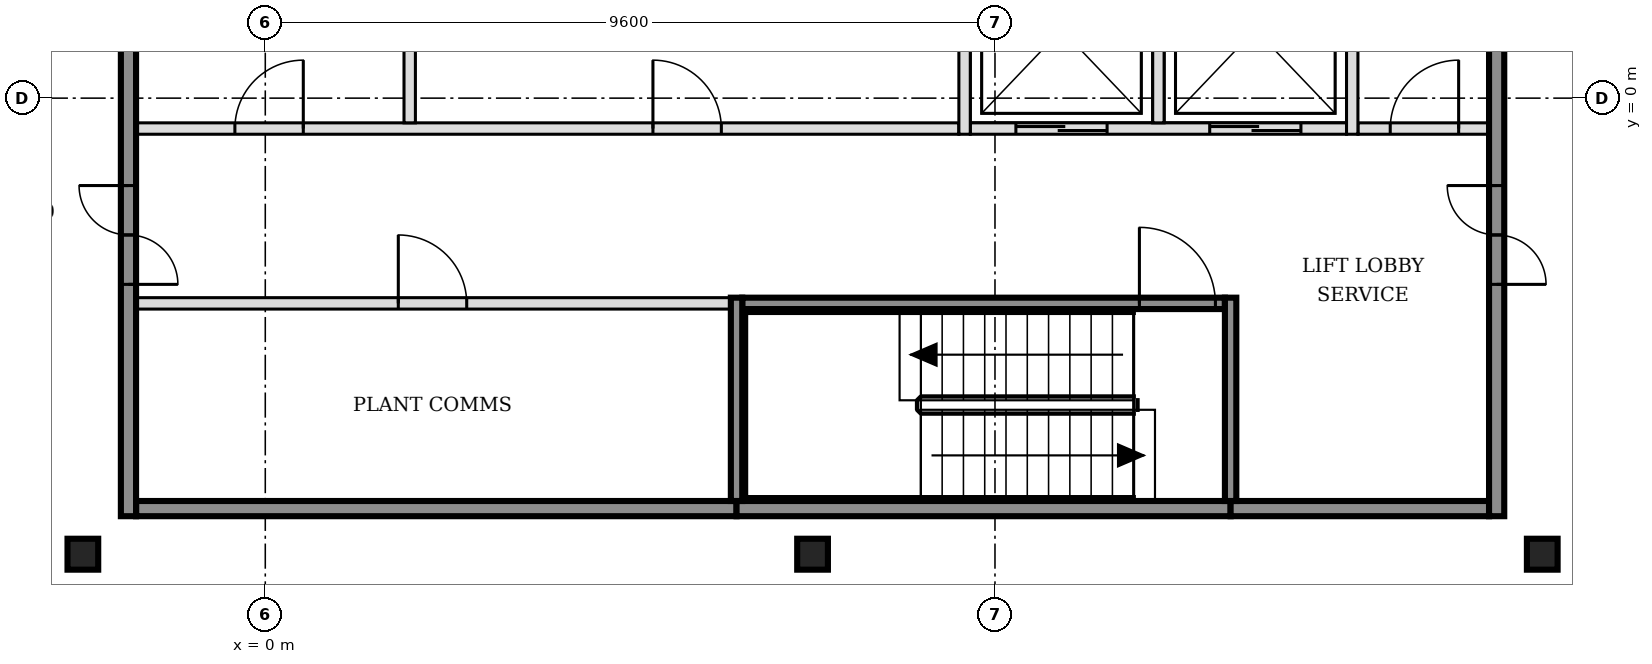
"""IFC4 building model, lengths in metres.
Left out: names, types, materials, properties, quantities, classifications, styles, units other than length and angle.
Written with IfcOpenShell. Run it as: python <this file> out.ifc"""

import sys

from ifc_helpers import new_model, si_unit, direction, frame, frame_2d, origin, origin_2d, place, context, subcontext, project, spatial, rectangle, i_section, extrude, element, fill, save


model = new_model("IFC4")
c1 = context("Model", 3, precision=1e-05, world=origin(), true_north=direction((0.0, 1.0)))
c2 = subcontext(c1, "Body", "Model", "MODEL_VIEW")
j1 = project(units=[si_unit("LENGTHUNIT", "METRE"), si_unit("PLANEANGLEUNIT", "RADIAN")], contexts=[c1])
p1 = place(None, origin())
s1 = spatial("IfcSite", under=j1, at=p1, CompositionType="ELEMENT")
p2 = place(p1, origin())
s2 = spatial("IfcBuilding", under=s1, at=p2, CompositionType="ELEMENT")
p3 = place(p2, frame((0.0, 0.0, 197.4)))
s3 = spatial("IfcBuildingStorey", under=s2, at=p3, CompositionType="ELEMENT", Elevation=197.4)
for number, where, z_axis, x_axis in (
    (1, (-2.4, -6.0, -0.15), (0.0, 0.0, 1.0), (1.0, 0.0, 0.0)),
    (2, (7.2, -6.0, -0.15), (0.0, 0.0, 1.0), (1.0, 0.0, 0.0)),
    (3, (16.8, -6.0, -0.15), (0.0, 0.0, 1.0), (1.0, 0.0, 0.0)),
):
    element("IfcColumn", number, at=place(p3, frame(where, z_axis=z_axis, x_axis=x_axis)), inside=s3, PredefinedType="COLUMN", context=c2, shape_type="SweptSolid", body=[
        extrude(i_section(OverallWidth=0.404, OverallDepth=0.407, WebThickness=0.027, FlangeThickness=0.044, FilletRadius=0.015, at=origin_2d()), origin(), (0.0, 0.0, 1.0), 3.6),
    ])
p4 = place(p3, frame((-1.7, -5.4, 0.0), z_axis=(0.0, 0.0, 1.0), x_axis=(1.0, 0.0, 0.0)))
e4 = element("IfcWall", 4, at=p4, inside=s3, PredefinedType="SOLIDWALL", context=c2, shape_type="SweptSolid", body=[
    extrude(rectangle(XDim=7.9, YDim=0.2, at=frame_2d((3.95, 0.0))), origin(), (0.0, 0.0, 1.0), 3.45),
])
p5 = place(p3, frame((6.2, -5.4, 0.0), z_axis=(0.0, 0.0, 1.0), x_axis=(1.0, 0.0, 0.0)))
e5 = element("IfcWall", 5, at=p5, inside=s3, PredefinedType="SOLIDWALL", context=c2, shape_type="SweptSolid", body=[
    extrude(rectangle(XDim=6.5, YDim=0.2, at=frame_2d((3.25, 0.0))), origin(), (0.0, 0.0, 1.0), 3.45),
])
p6 = place(p3, frame((12.7, -5.4, 0.0), z_axis=(0.0, 0.0, 1.0), x_axis=(1.0, 0.0, 0.0)))
e6 = element("IfcWall", 6, at=p6, inside=s3, PredefinedType="SOLIDWALL", context=c2, shape_type="SweptSolid", body=[
    extrude(rectangle(XDim=3.4, YDim=0.2, at=frame_2d((1.7, 0.0))), origin(), (0.0, 0.0, 1.0), 3.45),
])
p7 = place(p3, frame((-1.7, -2.7, 0.0), z_axis=(0.0, 0.0, 1.0), x_axis=(1.0, 0.0, 0.0)))
e7 = element("IfcWall", 7, at=p7, inside=s3, PredefinedType="PARTITIONING", context=c2, shape_type="SweptSolid", body=[
    extrude(rectangle(XDim=7.825, YDim=0.15, at=frame_2d((3.913, 0.0))), origin(), (0.0, 0.0, 1.0), 3.45),
])
p8 = place(p7, frame((3.45, 0.0, 0.0)))
e8 = element("IfcOpeningElement", 8, at=p8, cuts=e7, PredefinedType="OPENING", context=c2, shape_type="SweptSolid", body=[
    extrude(rectangle(XDim=0.9, YDim=2.1, at=frame_2d((0.45, 1.05))), frame((0.0, 0.085, 0.0), z_axis=(0.0, -1.0, 0.0), x_axis=(1.0, 0.0, 0.0)), (0.0, 0.0, 1.0), 0.17),
])
p9 = place(p3, frame((6.275, -2.7, 0.0), z_axis=(0.0, 0.0, 1.0), x_axis=(1.0, 0.0, 0.0)))
e9 = element("IfcWall", 9, at=p9, inside=s3, PredefinedType="SOLIDWALL", context=c2, shape_type="SweptSolid", body=[
    extrude(rectangle(XDim=6.35, YDim=0.15, at=frame_2d((3.175, 0.0))), origin(), (0.0, 0.0, 1.0), 3.45),
])
p10 = place(p9, frame((5.225, 0.0, 0.0)))
e10 = element("IfcOpeningElement", 10, at=p10, cuts=e9, PredefinedType="OPENING", context=c2, shape_type="SweptSolid", body=[
    extrude(rectangle(XDim=1.0, YDim=2.1, at=frame_2d((0.5, 1.05))), frame((0.0, 0.085, 0.0), z_axis=(0.0, -1.0, 0.0), x_axis=(1.0, 0.0, 0.0)), (0.0, 0.0, 1.0), 0.17),
])
p11 = place(p3, frame((-1.7, -0.4, 0.0), z_axis=(0.0, 0.0, 1.0), x_axis=(1.0, 0.0, 0.0)))
e11 = element("IfcWall", 11, at=p11, inside=s3, PredefinedType="PARTITIONING", context=c2, shape_type="SweptSolid", body=[
    extrude(rectangle(XDim=10.825, YDim=0.15, at=frame_2d((5.413, 0.0))), origin(), (0.0, 0.0, 1.0), 3.45),
])
p12 = place(p11, frame((1.3, 0.0, 0.0)))
e12 = element("IfcOpeningElement", 12, at=p12, cuts=e11, PredefinedType="OPENING", context=c2, shape_type="SweptSolid", body=[
    extrude(rectangle(XDim=0.9, YDim=2.1, at=frame_2d((0.45, 1.05))), frame((0.0, 0.085, 0.0), z_axis=(0.0, -1.0, 0.0), x_axis=(1.0, 0.0, 0.0)), (0.0, 0.0, 1.0), 0.17),
])
p13 = place(p11, frame((6.8, 0.0, 0.0)))
e13 = element("IfcOpeningElement", 13, at=p13, cuts=e11, PredefinedType="OPENING", context=c2, shape_type="SweptSolid", body=[
    extrude(rectangle(XDim=0.9, YDim=2.1, at=frame_2d((0.45, 1.05))), frame((0.0, 0.085, 0.0), z_axis=(0.0, -1.0, 0.0), x_axis=(1.0, 0.0, 0.0)), (0.0, 0.0, 1.0), 0.17),
])
p14 = place(p3, frame((9.275, -0.4, 0.0), z_axis=(0.0, 0.0, 1.0), x_axis=(1.0, 0.0, 0.0)))
e14 = element("IfcWall", 14, at=p14, inside=s3, PredefinedType="SOLIDWALL", context=c2, shape_type="SweptSolid", body=[
    extrude(rectangle(XDim=4.95, YDim=0.15, at=frame_2d((2.475, 0.0))), origin(), (0.0, 0.0, 1.0), 3.45),
])
p15 = place(p14, frame((0.6, 0.0, 0.0)))
e15 = element("IfcOpeningElement", 15, at=p15, cuts=e14, PredefinedType="OPENING", context=c2, shape_type="SweptSolid", body=[
    extrude(rectangle(XDim=1.2, YDim=2.1, at=frame_2d((0.6, 1.05))), frame((0.0, 0.085, 0.0), z_axis=(0.0, -1.0, 0.0), x_axis=(1.0, 0.0, 0.0)), (0.0, 0.0, 1.0), 0.17),
])
p16 = place(p14, frame((3.15, 0.0, 0.0)))
e16 = element("IfcOpeningElement", 16, at=p16, cuts=e14, PredefinedType="OPENING", context=c2, shape_type="SweptSolid", body=[
    extrude(rectangle(XDim=1.2, YDim=2.1, at=frame_2d((0.6, 1.05))), frame((0.0, 0.085, 0.0), z_axis=(0.0, -1.0, 0.0), x_axis=(1.0, 0.0, 0.0)), (0.0, 0.0, 1.0), 0.17),
])
p17 = place(p3, frame((14.375, -0.4, 0.0), z_axis=(0.0, 0.0, 1.0), x_axis=(1.0, 0.0, 0.0)))
e17 = element("IfcWall", 17, at=p17, inside=s3, PredefinedType="PARTITIONING", context=c2, shape_type="SweptSolid", body=[
    extrude(rectangle(XDim=1.725, YDim=0.15, at=frame_2d((0.863, 0.0))), origin(), (0.0, 0.0, 1.0), 3.45),
])
p18 = place(p17, frame((0.425, 0.0, 0.0)))
e18 = element("IfcOpeningElement", 18, at=p18, cuts=e17, PredefinedType="OPENING", context=c2, shape_type="SweptSolid", body=[
    extrude(rectangle(XDim=0.9, YDim=2.1, at=frame_2d((0.45, 1.05))), frame((0.0, 0.085, 0.0), z_axis=(0.0, -1.0, 0.0), x_axis=(1.0, 0.0, 0.0)), (0.0, 0.0, 1.0), 0.17),
])
p19 = place(p3, frame((-1.8, -5.5, 0.0), z_axis=(0.0, 0.0, 1.0), x_axis=(0.0, 1.0, 0.0)))
e19 = element("IfcWall", 19, at=p19, inside=s3, PredefinedType="SOLIDWALL", context=c2, shape_type="SweptSolid", body=[
    extrude(rectangle(XDim=15.8, YDim=0.2, at=frame_2d((7.9, 0.0))), origin(), (0.0, 0.0, 1.0), 3.45),
])
p20 = place(p19, frame((3.05, 0.0, 0.0)))
e20 = element("IfcOpeningElement", 20, at=p20, cuts=e19, PredefinedType="OPENING", context=c2, shape_type="SweptSolid", body=[
    extrude(rectangle(XDim=1.3, YDim=2.1, at=frame_2d((0.65, 1.05))), frame((0.0, 0.11, 0.0), z_axis=(0.0, -1.0, 0.0), x_axis=(1.0, 0.0, 0.0)), (0.0, 0.0, 1.0), 0.22),
])
p21 = place(p19, frame((11.45, 0.0, 0.0)))
e21 = element("IfcOpeningElement", 21, at=p21, cuts=e19, PredefinedType="OPENING", context=c2, shape_type="SweptSolid", body=[
    extrude(rectangle(XDim=1.3, YDim=2.1, at=frame_2d((0.65, 1.05))), frame((0.0, 0.11, 0.0), z_axis=(0.0, -1.0, 0.0), x_axis=(1.0, 0.0, 0.0)), (0.0, 0.0, 1.0), 0.22),
])
p22 = place(p3, frame((1.9, -0.325, 0.0), z_axis=(0.0, 0.0, 1.0), x_axis=(0.0, 1.0, 0.0)))
e22 = element("IfcWall", 22, at=p22, inside=s3, PredefinedType="PARTITIONING", context=c2, shape_type="SweptSolid", body=[
    extrude(rectangle(XDim=2.45, YDim=0.15, at=frame_2d((1.225, 0.0))), origin(), (0.0, 0.0, 1.0), 3.45),
])
p23 = place(p3, frame((6.2, -5.3, 0.0), z_axis=(0.0, 0.0, 1.0), x_axis=(0.0, 1.0, 0.0)))
e23 = element("IfcWall", 23, at=p23, inside=s3, PredefinedType="SOLIDWALL", context=c2, shape_type="SweptSolid", body=[
    extrude(rectangle(XDim=2.675, YDim=0.15, at=frame_2d((1.337, 0.0))), origin(), (0.0, 0.0, 1.0), 3.45),
])
p24 = place(p3, frame((9.2, -0.475, 0.0), z_axis=(0.0, 0.0, 1.0), x_axis=(0.0, 1.0, 0.0)))
e24 = element("IfcWall", 24, at=p24, inside=s3, PredefinedType="SOLIDWALL", context=c2, shape_type="SweptSolid", body=[
    extrude(rectangle(XDim=2.6, YDim=0.15, at=frame_2d((1.3, 0.0))), origin(), (0.0, 0.0, 1.0), 3.45),
])
p25 = place(p3, frame((11.75, -0.325, 0.0), z_axis=(0.0, 0.0, 1.0), x_axis=(0.0, 1.0, 0.0)))
e25 = element("IfcWall", 25, at=p25, inside=s3, PredefinedType="SOLIDWALL", context=c2, shape_type="SweptSolid", body=[
    extrude(rectangle(XDim=2.45, YDim=0.15, at=frame_2d((1.225, 0.0))), origin(), (0.0, 0.0, 1.0), 3.45),
])
p26 = place(p3, frame((12.7, -5.3, 0.0), z_axis=(0.0, 0.0, 1.0), x_axis=(0.0, 1.0, 0.0)))
e26 = element("IfcWall", 26, at=p26, inside=s3, PredefinedType="SOLIDWALL", context=c2, shape_type="SweptSolid", body=[
    extrude(rectangle(XDim=2.675, YDim=0.15, at=frame_2d((1.337, 0.0))), origin(), (0.0, 0.0, 1.0), 3.45),
])
p27 = place(p3, frame((14.3, -0.475, 0.0), z_axis=(0.0, 0.0, 1.0), x_axis=(0.0, 1.0, 0.0)))
e27 = element("IfcWall", 27, at=p27, inside=s3, PredefinedType="SOLIDWALL", context=c2, shape_type="SweptSolid", body=[
    extrude(rectangle(XDim=2.75, YDim=0.15, at=frame_2d((1.375, 0.0))), origin(), (0.0, 0.0, 1.0), 3.45),
])
p28 = place(p3, frame((16.2, -5.5, 0.0), z_axis=(0.0, 0.0, 1.0), x_axis=(0.0, 1.0, 0.0)))
e28 = element("IfcWall", 28, at=p28, inside=s3, PredefinedType="SOLIDWALL", context=c2, shape_type="SweptSolid", body=[
    extrude(rectangle(XDim=15.8, YDim=0.2, at=frame_2d((7.9, 0.0))), origin(), (0.0, 0.0, 1.0), 3.45),
])
p29 = place(p28, frame((3.05, 0.0, 0.0)))
e29 = element("IfcOpeningElement", 29, at=p29, cuts=e28, PredefinedType="OPENING", context=c2, shape_type="SweptSolid", body=[
    extrude(rectangle(XDim=1.3, YDim=2.1, at=frame_2d((0.65, 1.05))), frame((0.0, 0.11, 0.0), z_axis=(0.0, -1.0, 0.0), x_axis=(1.0, 0.0, 0.0)), (0.0, 0.0, 1.0), 0.22),
])
p30 = place(p28, frame((11.45, 0.0, 0.0)))
e30 = element("IfcOpeningElement", 30, at=p30, cuts=e28, PredefinedType="OPENING", context=c2, shape_type="SweptSolid", body=[
    extrude(rectangle(XDim=1.3, YDim=2.1, at=frame_2d((0.65, 1.05))), frame((0.0, 0.11, 0.0), z_axis=(0.0, -1.0, 0.0), x_axis=(1.0, 0.0, 0.0)), (0.0, 0.0, 1.0), 0.22),
])
p31 = place(p15, origin())
e31 = element("IfcDoor", 31, at=p31, inside=s3, OperationType="DOUBLE_DOOR_SLIDING", PredefinedType="DOOR", context=c2, shape_type="SweptSolid", body=[
    extrude(rectangle(XDim=1.2, YDim=2.1, at=frame_2d((0.6, 1.05))), frame((0.0, 0.025, 0.0), z_axis=(0.0, -1.0, 0.0), x_axis=(1.0, 0.0, 0.0)), (0.0, 0.0, 1.0), 0.05),
])
fill(e15, e31)
p32 = place(p16, origin())
e32 = element("IfcDoor", 32, at=p32, inside=s3, OperationType="DOUBLE_DOOR_SLIDING", PredefinedType="DOOR", context=c2, shape_type="SweptSolid", body=[
    extrude(rectangle(XDim=1.2, YDim=2.1, at=frame_2d((0.6, 1.05))), frame((0.0, 0.025, 0.0), z_axis=(0.0, -1.0, 0.0), x_axis=(1.0, 0.0, 0.0)), (0.0, 0.0, 1.0), 0.05),
])
fill(e16, e32)
p33 = place(p10, origin())
e33 = element("IfcDoor", 33, at=p33, inside=s3, OperationType="SINGLE_SWING_LEFT", PredefinedType="DOOR", context=c2, shape_type="SweptSolid", body=[
    extrude(rectangle(XDim=1.0, YDim=2.1, at=frame_2d((0.5, 1.05))), frame((0.0, 0.025, 0.0), z_axis=(0.0, -1.0, 0.0), x_axis=(1.0, 0.0, 0.0)), (0.0, 0.0, 1.0), 0.05),
])
fill(e10, e33)
p34 = place(p20, origin())
e34 = element("IfcDoor", 34, at=p34, inside=s3, OperationType="DOUBLE_DOOR_SINGLE_SWING", PredefinedType="DOOR", context=c2, shape_type="SweptSolid", body=[
    extrude(rectangle(XDim=1.3, YDim=2.1, at=frame_2d((0.65, 1.05))), frame((0.0, 0.025, 0.0), z_axis=(0.0, -1.0, 0.0), x_axis=(1.0, 0.0, 0.0)), (0.0, 0.0, 1.0), 0.05),
])
fill(e20, e34)
p35 = place(p29, origin())
e35 = element("IfcDoor", 35, at=p35, inside=s3, OperationType="DOUBLE_DOOR_SINGLE_SWING", PredefinedType="DOOR", context=c2, shape_type="SweptSolid", body=[
    extrude(rectangle(XDim=1.3, YDim=2.1, at=frame_2d((0.65, 1.05))), frame((0.0, 0.025, 0.0), z_axis=(0.0, -1.0, 0.0), x_axis=(1.0, 0.0, 0.0)), (0.0, 0.0, 1.0), 0.05),
])
fill(e29, e35)
p36 = place(p18, origin())
e36 = element("IfcDoor", 36, at=p36, inside=s3, OperationType="SINGLE_SWING_RIGHT", PredefinedType="DOOR", context=c2, shape_type="SweptSolid", body=[
    extrude(rectangle(XDim=0.9, YDim=2.1, at=frame_2d((0.45, 1.05))), frame((0.0, 0.025, 0.0), z_axis=(0.0, -1.0, 0.0), x_axis=(1.0, 0.0, 0.0)), (0.0, 0.0, 1.0), 0.05),
])
fill(e18, e36)
p37 = place(p8, origin())
e37 = element("IfcDoor", 37, at=p37, inside=s3, OperationType="SINGLE_SWING_LEFT", PredefinedType="DOOR", context=c2, shape_type="SweptSolid", body=[
    extrude(rectangle(XDim=0.9, YDim=2.1, at=frame_2d((0.45, 1.05))), frame((0.0, 0.025, 0.0), z_axis=(0.0, -1.0, 0.0), x_axis=(1.0, 0.0, 0.0)), (0.0, 0.0, 1.0), 0.05),
])
fill(e8, e37)
p38 = place(p12, origin())
e38 = element("IfcDoor", 38, at=p38, inside=s3, OperationType="SINGLE_SWING_RIGHT", PredefinedType="DOOR", context=c2, shape_type="SweptSolid", body=[
    extrude(rectangle(XDim=0.9, YDim=2.1, at=frame_2d((0.45, 1.05))), frame((0.0, 0.025, 0.0), z_axis=(0.0, -1.0, 0.0), x_axis=(1.0, 0.0, 0.0)), (0.0, 0.0, 1.0), 0.05),
])
fill(e12, e38)
p39 = place(p13, origin())
e39 = element("IfcDoor", 39, at=p39, inside=s3, OperationType="SINGLE_SWING_LEFT", PredefinedType="DOOR", context=c2, shape_type="SweptSolid", body=[
    extrude(rectangle(XDim=0.9, YDim=2.1, at=frame_2d((0.45, 1.05))), frame((0.0, 0.025, 0.0), z_axis=(0.0, -1.0, 0.0), x_axis=(1.0, 0.0, 0.0)), (0.0, 0.0, 1.0), 0.05),
])
fill(e13, e39)
save(model, sys.argv[1])
